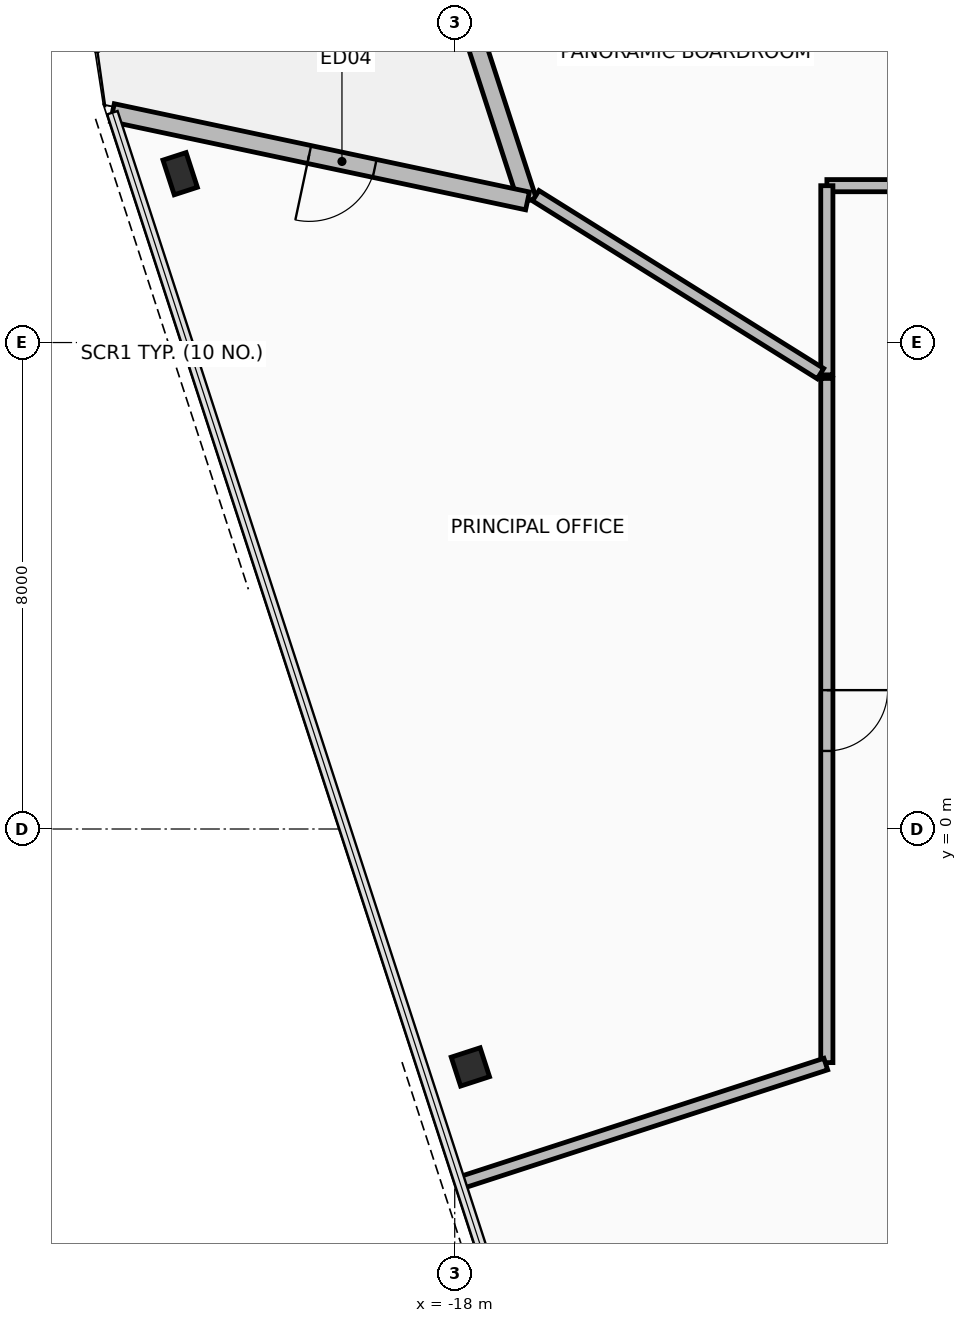
"""IFC4 building model, lengths in metres.
Left out: names, types, materials, properties, quantities, classifications, styles, units other than length and angle.
Written with IfcOpenShell. Run it as: python <this file> out.ifc"""

import sys

from ifc_helpers import new_model, si_unit, direction, frame, frame_2d, origin, origin_2d, place, context, subcontext, project, spatial, rectangle, hollow_rectangle, extrude, element, fill, save


model = new_model("IFC4")
c1 = context("Model", 3, precision=1e-05, world=origin(), true_north=direction((0.0, 1.0)))
c2 = subcontext(c1, "Body", "Model", "MODEL_VIEW")
j1 = project(units=[si_unit("LENGTHUNIT", "METRE"), si_unit("PLANEANGLEUNIT", "RADIAN")], contexts=[c1])
p1 = place(None, origin())
s1 = spatial("IfcSite", under=j1, at=p1, CompositionType="ELEMENT")
p2 = place(p1, origin())
s2 = spatial("IfcBuilding", under=s1, at=p2, CompositionType="ELEMENT")
p3 = place(p2, frame((0.0, 0.0, 207.65)))
s3 = spatial("IfcBuildingStorey", under=s2, at=p3, CompositionType="ELEMENT", Elevation=207.65)
p4 = place(p3, frame((-22.515, 10.777, 0.0), z_axis=(0.0, 0.0, 1.0), x_axis=(-0.309016994375, 0.951056516295, 0.0)))
e1 = element("IfcColumn", 1, at=p4, inside=s3, PredefinedType="COLUMN", context=c2, shape_type="SweptSolid", body=[
    extrude(hollow_rectangle(XDim=0.4, YDim=0.6, WallThickness=0.03, at=origin_2d()), origin(), (0.0, 0.0, 1.0), 3.6),
])
p5 = place(p3, frame((-17.743, -3.913, 0.0), z_axis=(0.0, 0.0, 1.0), x_axis=(-0.309016994375, 0.951056516295, 0.0)))
e2 = element("IfcColumn", 2, at=p5, inside=s3, PredefinedType="COLUMN", context=c2, shape_type="SweptSolid", body=[
    extrude(hollow_rectangle(XDim=0.5, YDim=0.5, WallThickness=0.032, at=origin_2d()), origin(), (0.0, 0.0, 1.0), 3.6),
])
p6 = place(p3, frame((-18.96, 16.968, 0.0), z_axis=(0.0, 0.0, 1.0), x_axis=(0.309030708092, -0.951052060329, 0.0)))
e3 = element("IfcWall", 3, at=p6, inside=s3, PredefinedType="STANDARD", context=c2, shape_type="SweptSolid", body=[
    extrude(rectangle(XDim=6.98, YDim=0.3, at=frame_2d((3.49, 0.0))), origin(), (0.0, 0.0, 1.0), 2.715),
])
p7 = place(p6, frame((2.69, 0.0, 0.335)))
e4 = element("IfcOpeningElement", 4, at=p7, cuts=e3, PredefinedType="OPENING", context=c2, shape_type="SweptSolid", body=[
    extrude(rectangle(XDim=1.6, YDim=2.2, at=frame_2d((0.8, 1.1))), frame((0.0, 0.16, 0.0), z_axis=(0.0, -1.0, 0.0), x_axis=(1.0, 0.0, 0.0)), (0.0, 0.0, 1.0), 0.32),
])
p8 = place(p3, frame((-16.803, 10.329, 0.0), z_axis=(0.0, 0.0, 1.0), x_axis=(-0.9781486268, 0.207906863497, 0.0)))
e5 = element("IfcWall", 5, at=p8, inside=s3, PredefinedType="STANDARD", context=c2, shape_type="SweptSolid", body=[
    extrude(rectangle(XDim=6.98, YDim=0.3, at=frame_2d((3.49, 0.0))), origin(), (0.0, 0.0, 1.0), 2.715),
])
p9 = place(p8, frame((2.57, 0.0, 0.0)))
e6 = element("IfcOpeningElement", 6, at=p9, cuts=e5, PredefinedType="OPENING", context=c2, shape_type="SweptSolid", body=[
    extrude(rectangle(XDim=1.1, YDim=2.2, at=frame_2d((0.55, 1.1))), frame((0.0, 0.16, 0.0), z_axis=(0.0, -1.0, 0.0), x_axis=(1.0, 0.0, 0.0)), (0.0, 0.0, 1.0), 0.32),
])
p10 = place(p3, frame((-1.516, 10.58, 0.0), z_axis=(0.0, 0.0, 1.0), x_axis=(-1.0, 0.0, 0.0)))
e7 = element("IfcWall", 7, at=p10, inside=s3, PredefinedType="PARTITIONING", context=c2, shape_type="SweptSolid", body=[
    extrude(rectangle(XDim=10.364, YDim=0.2, at=frame_2d((5.182, 0.0))), origin(), (0.0, 0.0, 1.0), 2.865),
])
p11 = place(p10, frame((4.582, 0.0, 0.0)))
e8 = element("IfcOpeningElement", 8, at=p11, cuts=e7, PredefinedType="OPENING", context=c2, shape_type="SweptSolid", body=[
    extrude(rectangle(XDim=1.2, YDim=2.15, at=frame_2d((0.6, 1.075))), frame((0.0, 0.11, 0.0), z_axis=(0.0, -1.0, 0.0), x_axis=(1.0, 0.0, 0.0)), (0.0, 0.0, 1.0), 0.22),
])
p12 = place(p3, frame((-11.88, 10.579, 0.0), z_axis=(0.0, 0.0, 1.0), x_axis=(0.0, -1.0, 0.0)))
e9 = element("IfcWall", 9, at=p12, inside=s3, PredefinedType="PARTITIONING", context=c2, shape_type="SweptSolid", body=[
    extrude(rectangle(XDim=3.111, YDim=0.2, at=frame_2d((1.555, 0.0))), origin(), (0.0, 0.0, 1.0), 2.765),
])
p13 = place(p3, frame((-11.985, 7.489, 0.0), z_axis=(0.0, 0.0, 1.0), x_axis=(-0.848035563326, 0.529939320427, 0.0)))
e10 = element("IfcWall", 10, at=p13, inside=s3, PredefinedType="PARTITIONING", context=c2, shape_type="SweptSolid", body=[
    extrude(rectangle(XDim=5.521, YDim=0.2, at=frame_2d((2.761, 0.0))), origin(), (0.0, 0.0, 1.0), 2.865),
])
p14 = place(p3, frame((-11.88, 7.41, 0.0), z_axis=(0.0, 0.0, 1.0), x_axis=(0.0, -1.0, 0.0)))
e11 = element("IfcWall", 11, at=p14, inside=s3, PredefinedType="PARTITIONING", context=c2, shape_type="SweptSolid", body=[
    extrude(rectangle(XDim=11.251, YDim=0.2, at=frame_2d((5.626, 0.0))), origin(), (0.0, 0.0, 1.0), 3.42),
])
p15 = place(p14, frame((5.126, 0.0, 0.0)))
e12 = element("IfcOpeningElement", 12, at=p15, cuts=e11, PredefinedType="OPENING", context=c2, shape_type="SweptSolid", body=[
    extrude(rectangle(XDim=1.0, YDim=2.15, at=frame_2d((0.5, 1.075))), frame((0.0, 0.11, 0.0), z_axis=(0.0, -1.0, 0.0), x_axis=(1.0, 0.0, 0.0)), (0.0, 0.0, 1.0), 0.22),
])
p16 = place(p3, frame((-11.897, -3.866, 0.0), z_axis=(0.0, 0.0, 1.0), x_axis=(-0.951062833603, -0.308997551024, 0.0)))
e13 = element("IfcWall", 13, at=p16, inside=s3, PredefinedType="PARTITIONING", context=c2, shape_type="SweptSolid", body=[
    extrude(rectangle(XDim=6.299, YDim=0.2, at=frame_2d((3.149, 0.0))), origin(), (0.0, 0.0, 1.0), 2.715),
])
p17 = place(p9, frame((1.1, 0.0, 0.0), z_axis=(0.0, 0.0, 1.0), x_axis=(-1.0, 0.0, 0.0)))
e14 = element("IfcDoor", 14, at=p17, inside=s3, OperationType="SINGLE_SWING_LEFT", PredefinedType="DOOR", context=c2, shape_type="SweptSolid", body=[
    extrude(rectangle(XDim=1.1, YDim=2.2, at=frame_2d((0.55, 1.1))), frame((0.0, 0.025, 0.0), z_axis=(0.0, -1.0, 0.0), x_axis=(1.0, 0.0, 0.0)), (0.0, 0.0, 1.0), 0.05),
])
fill(e6, e14)
p18 = place(p15, origin())
e15 = element("IfcDoor", 15, at=p18, inside=s3, OperationType="SINGLE_SWING_RIGHT", PredefinedType="DOOR", context=c2, shape_type="SweptSolid", body=[
    extrude(rectangle(XDim=1.0, YDim=2.15, at=frame_2d((0.5, 1.075))), frame((0.0, 0.025, 0.0), z_axis=(0.0, -1.0, 0.0), x_axis=(1.0, 0.0, 0.0)), (0.0, 0.0, 1.0), 0.05),
])
fill(e12, e15)
save(model, sys.argv[1])
